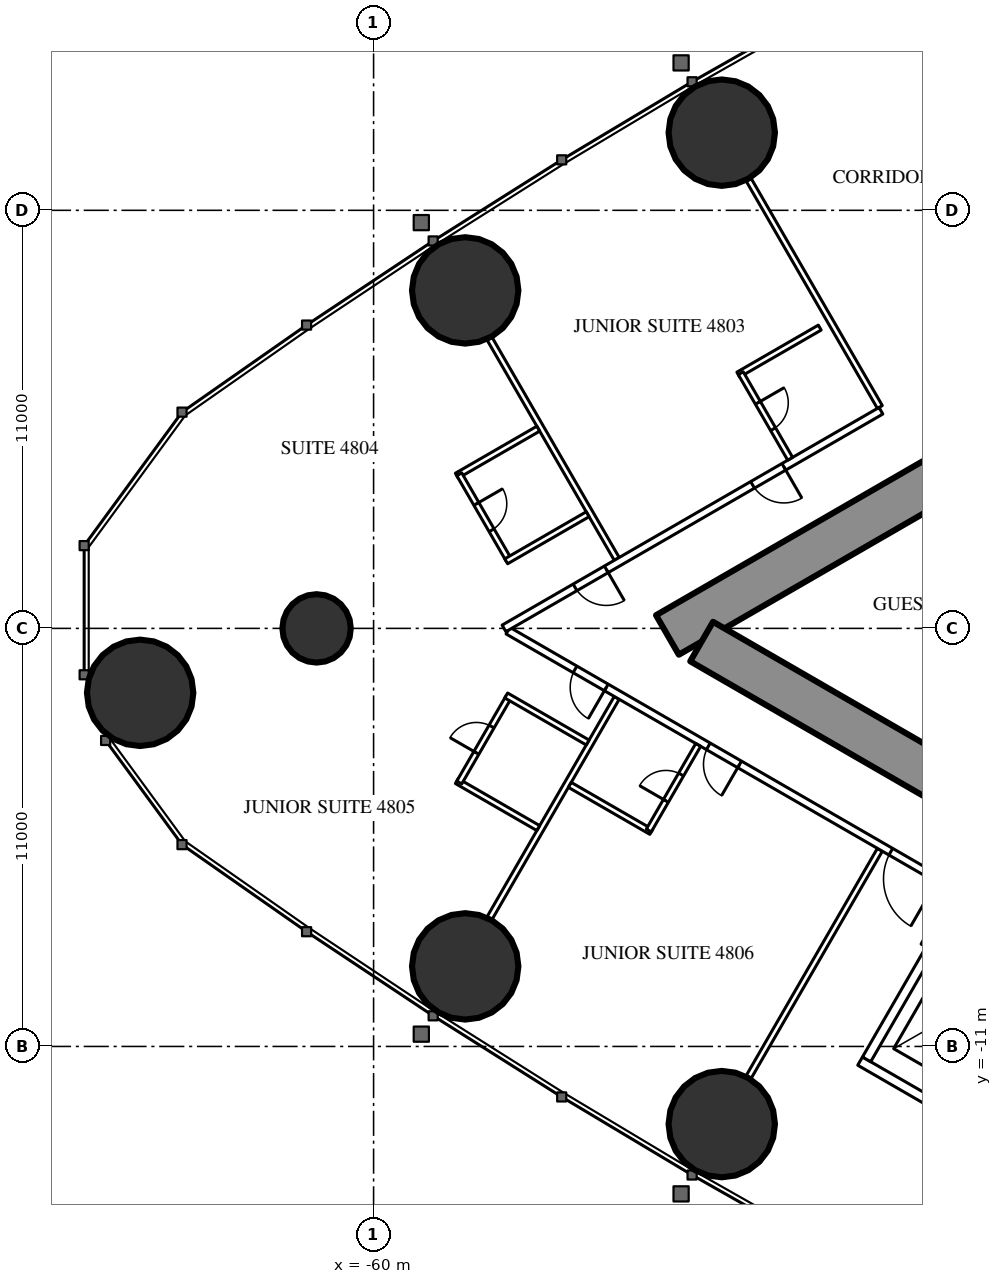
"""IFC4 building model, lengths in metres.
Left out: names, types, materials, properties, quantities, classifications, styles, units other than length and angle.
Written with IfcOpenShell. Run it as: python <this file> out.ifc"""

import sys

from ifc_helpers import new_model, si_unit, direction, frame, frame_2d, origin, origin_2d, place, context, subcontext, project, spatial, rectangle, circle, extrude, element, fill, save


model = new_model("IFC4")
c1 = context("Model", 3, precision=1e-05, world=origin(), true_north=direction((0.0, 1.0)))
c2 = subcontext(c1, "Body", "Model", "MODEL_VIEW")
j1 = project(units=[si_unit("LENGTHUNIT", "METRE"), si_unit("PLANEANGLEUNIT", "RADIAN")], contexts=[c1])
p1 = place(None, origin())
s1 = spatial("IfcSite", under=j1, at=p1, CompositionType="ELEMENT")
p2 = place(p1, origin())
s2 = spatial("IfcBuilding", under=s1, at=p2, CompositionType="ELEMENT")
p3 = place(p2, frame((0.0, 0.0, 180.8)))
s3 = spatial("IfcBuildingStorey", under=s2, at=p3, CompositionType="ELEMENT", Elevation=180.8)
for number, where, z_axis, x_axis in (
    (1, (-66.143, -1.695, 0.0), (0.0, 0.0, 1.0), (1.0, 0.0, 0.0)),
    (2, (-57.59, -8.893, 0.0), (0.0, 0.0, 1.0), (1.0, 0.0, 0.0)),
    (3, (-50.839, -13.043, 0.0), (0.0, 0.0, 1.0), (1.0, 0.0, 0.0)),
    (4, (-50.839, 13.043, 0.0), (0.0, 0.0, 1.0), (1.0, 0.0, 0.0)),
    (5, (-57.59, 8.893, 0.0), (0.0, 0.0, 1.0), (1.0, 0.0, 0.0)),
):
    element("IfcColumn", number, at=place(p3, frame(where, z_axis=z_axis, x_axis=x_axis)), inside=s3, PredefinedType="COLUMN", context=c2, shape_type="SweptSolid", body=[
        extrude(circle(Radius=1.4, at=origin_2d()), origin(), (0.0, 0.0, 1.0), 3.5),
    ])
p4 = place(p3, frame((-61.5, 0.0, 0.0), z_axis=(0.0, 0.0, 1.0), x_axis=(1.0, 0.0, 0.0)))
e6 = element("IfcColumn", 6, at=p4, inside=s3, PredefinedType="COLUMN", context=c2, shape_type="SweptSolid", body=[
    extrude(circle(Radius=0.9, at=origin_2d()), origin(), (0.0, 0.0, 1.0), 3.5),
])
p5 = place(p3, frame((-27.2, 14.3, 0.0), z_axis=(0.0, 0.0, 1.0), x_axis=(-0.866026593062, -0.499997940104, 0.0)))
e7 = element("IfcWall", 7, at=p5, inside=s3, PredefinedType="SHEAR", context=c2, shape_type="SweptSolid", body=[
    extrude(rectangle(XDim=28.946, YDim=1.2, at=frame_2d((14.473, 0.0))), origin(), (0.0, 0.0, 1.0), 3.5),
])
p6 = place(p5, frame((4.6, 0.0, 0.0)))
e8 = element("IfcOpeningElement", 8, at=p6, cuts=e7, PredefinedType="OPENING", context=c2, shape_type="SweptSolid", body=[
    extrude(rectangle(XDim=1.0, YDim=2.2, at=frame_2d((0.5, 1.1))), frame((0.0, 0.61, 0.0), z_axis=(0.0, -1.0, 0.0), x_axis=(1.0, 0.0, 0.0)), (0.0, 0.0, 1.0), 1.22),
])
p7 = place(p5, frame((13.395, 0.0, 0.0)))
e9 = element("IfcOpeningElement", 9, at=p7, cuts=e7, PredefinedType="OPENING", context=c2, shape_type="SweptSolid", body=[
    extrude(rectangle(XDim=1.8, YDim=2.2, at=frame_2d((0.9, 1.1))), frame((0.0, 0.61, 0.0), z_axis=(0.0, -1.0, 0.0), x_axis=(1.0, 0.0, 0.0)), (0.0, 0.0, 1.0), 1.22),
])
p8 = place(p3, frame((-27.2, -14.3, 0.0), z_axis=(0.0, 0.0, 1.0), x_axis=(-0.866024021859, 0.500002393557, 0.0)))
e10 = element("IfcWall", 10, at=p8, inside=s3, PredefinedType="SHEAR", context=c2, shape_type="SweptSolid", body=[
    extrude(rectangle(XDim=27.907, YDim=1.2, at=frame_2d((13.954, 0.0))), origin(), (0.0, 0.0, 1.0), 3.5),
])
p9 = place(p8, frame((4.6, 0.0, 0.0)))
e11 = element("IfcOpeningElement", 11, at=p9, cuts=e10, PredefinedType="OPENING", context=c2, shape_type="SweptSolid", body=[
    extrude(rectangle(XDim=1.0, YDim=2.2, at=frame_2d((0.5, 1.1))), frame((0.0, 0.61, 0.0), z_axis=(0.0, -1.0, 0.0), x_axis=(1.0, 0.0, 0.0)), (0.0, 0.0, 1.0), 1.22),
])
p10 = place(p8, frame((13.395, 0.0, 0.0)))
e12 = element("IfcOpeningElement", 12, at=p10, cuts=e10, PredefinedType="OPENING", context=c2, shape_type="SweptSolid", body=[
    extrude(rectangle(XDim=1.8, YDim=2.2, at=frame_2d((0.9, 1.1))), frame((0.0, 0.61, 0.0), z_axis=(0.0, -1.0, 0.0), x_axis=(1.0, 0.0, 0.0)), (0.0, 0.0, 1.0), 1.22),
])
p11 = place(p3, frame((-46.679, 5.825, 0.0), z_axis=(0.0, 0.0, 1.0), x_axis=(-0.500006839597, 0.866021454905, 0.0)))
e13 = element("IfcWall", 13, at=p11, inside=s3, PredefinedType="PARTITIONING", context=c2, shape_type="SweptSolid", body=[
    extrude(rectangle(XDim=6.911, YDim=0.15, at=frame_2d((3.456, 0.0))), origin(), (0.0, 0.0, 1.0), 2.3),
])
p12 = place(p3, frame((-53.602, 1.828, 0.0), z_axis=(0.0, 0.0, 1.0), x_axis=(-0.49999191814, 0.866030069798, 0.0)))
e14 = element("IfcWall", 14, at=p12, inside=s3, PredefinedType="PARTITIONING", context=c2, shape_type="SweptSolid", body=[
    extrude(rectangle(XDim=6.692, YDim=0.15, at=frame_2d((3.346, 0.0))), origin(), (0.0, 0.0, 1.0), 2.3),
])
p13 = place(p3, frame((-46.679, -5.825, 0.0), z_axis=(0.0, 0.0, 1.0), x_axis=(-0.500006839597, -0.866021454905, 0.0)))
e15 = element("IfcWall", 15, at=p13, inside=s3, PredefinedType="PARTITIONING", context=c2, shape_type="SweptSolid", body=[
    extrude(rectangle(XDim=6.911, YDim=0.15, at=frame_2d((3.456, 0.0))), origin(), (0.0, 0.0, 1.0), 2.3),
])
p14 = place(p3, frame((-53.602, -1.828, 0.0), z_axis=(0.0, 0.0, 1.0), x_axis=(-0.49999191814, -0.866030069798, 0.0)))
e16 = element("IfcWall", 16, at=p14, inside=s3, PredefinedType="PARTITIONING", context=c2, shape_type="SweptSolid", body=[
    extrude(rectangle(XDim=6.692, YDim=0.15, at=frame_2d((3.346, 0.0))), origin(), (0.0, 0.0, 1.0), 2.3),
])
p15 = place(p3, frame((-44.715, -6.844, 0.0), z_axis=(0.0, 0.0, 1.0), x_axis=(-0.866025261224, 0.500000246922, 0.0)))
e17 = element("IfcWall", 17, at=p15, inside=s3, PredefinedType="PARTITIONING", context=c2, shape_type="SweptSolid", body=[
    extrude(rectangle(XDim=13.567, YDim=0.2, at=frame_2d((6.783, 0.0))), origin(), (0.0, 0.0, 1.0), 3.25),
])
p16 = place(p15, frame((10.579, 0.0, 0.0)))
e18 = element("IfcOpeningElement", 18, at=p16, cuts=e17, PredefinedType="OPENING", context=c2, shape_type="SweptSolid", body=[
    extrude(rectangle(XDim=0.95, YDim=2.2, at=frame_2d((0.475, 1.1))), frame((0.0, 0.11, 0.0), z_axis=(0.0, -1.0, 0.0), x_axis=(1.0, 0.0, 0.0)), (0.0, 0.0, 1.0), 0.22),
])
p17 = place(p15, frame((6.529, 0.0, 0.0)))
e19 = element("IfcOpeningElement", 19, at=p17, cuts=e17, PredefinedType="OPENING", context=c2, shape_type="SweptSolid", body=[
    extrude(rectangle(XDim=0.95, YDim=2.2, at=frame_2d((0.475, 1.1))), frame((0.0, 0.11, 0.0), z_axis=(0.0, -1.0, 0.0), x_axis=(1.0, 0.0, 0.0)), (0.0, 0.0, 1.0), 0.22),
])
p18 = place(p15, frame((0.5, 0.0, 0.0)))
e20 = element("IfcOpeningElement", 20, at=p18, cuts=e17, PredefinedType="OPENING", context=c2, shape_type="SweptSolid", body=[
    extrude(rectangle(XDim=1.435, YDim=2.2, at=frame_2d((0.718, 1.1))), frame((0.0, 0.11, 0.0), z_axis=(0.0, -1.0, 0.0), x_axis=(1.0, 0.0, 0.0)), (0.0, 0.0, 1.0), 0.22),
])
p19 = place(p3, frame((-44.652, -6.764, 0.0), z_axis=(0.0, 0.0, 1.0), x_axis=(-0.485424724123, -0.874278466629, 0.0)))
e21 = element("IfcWall", 21, at=p19, inside=s3, PredefinedType="PARTITIONING", context=c2, shape_type="SweptSolid", body=[
    extrude(rectangle(XDim=1.805, YDim=0.15, at=frame_2d((0.903, 0.0))), origin(), (0.0, 0.0, 1.0), 3.25),
])
p20 = place(p3, frame((-46.65, 5.726, 0.0), z_axis=(0.0, 0.0, 1.0), x_axis=(-0.866027963864, -0.499995565786, 0.0)))
e22 = element("IfcWall", 22, at=p20, inside=s3, PredefinedType="PARTITIONING", context=c2, shape_type="SweptSolid", body=[
    extrude(rectangle(XDim=11.452, YDim=0.2, at=frame_2d((5.726, 0.0))), origin(), (0.0, 0.0, 1.0), 3.25),
])
p21 = place(p20, frame((2.95, 0.0, 0.0)))
e23 = element("IfcOpeningElement", 23, at=p21, cuts=e22, PredefinedType="OPENING", context=c2, shape_type="SweptSolid", body=[
    extrude(rectangle(XDim=0.95, YDim=2.2, at=frame_2d((0.475, 1.1))), frame((0.0, 0.11, 0.0), z_axis=(0.0, -1.0, 0.0), x_axis=(1.0, 0.0, 0.0)), (0.0, 0.0, 1.0), 0.22),
])
p22 = place(p20, frame((8.344, 0.0, 0.0)))
e24 = element("IfcOpeningElement", 24, at=p22, cuts=e22, PredefinedType="OPENING", context=c2, shape_type="SweptSolid", body=[
    extrude(rectangle(XDim=0.95, YDim=2.2, at=frame_2d((0.475, 1.1))), frame((0.0, 0.11, 0.0), z_axis=(0.0, -1.0, 0.0), x_axis=(1.0, 0.0, 0.0)), (0.0, 0.0, 1.0), 0.22),
])
p23 = place(p3, frame((-48.26, 7.914, 0.0), z_axis=(0.0, 0.0, 1.0), x_axis=(-0.866031185235, -0.4999899861, 0.0)))
e25 = element("IfcWall", 25, at=p23, inside=s3, PredefinedType="PARTITIONING", context=c2, shape_type="SweptSolid", body=[
    extrude(rectangle(XDim=2.475, YDim=0.15, at=frame_2d((1.238, 0.0))), origin(), (0.0, 0.0, 1.0), 3.25),
])
p24 = place(p3, frame((-49.039, 4.463, 0.0), z_axis=(0.0, 0.0, 1.0), x_axis=(-0.499936506574, 0.866062058628, 0.0)))
e26 = element("IfcWall", 26, at=p24, inside=s3, PredefinedType="PARTITIONING", context=c2, shape_type="SweptSolid", body=[
    extrude(rectangle(XDim=2.6, YDim=0.15, at=frame_2d((1.3, 0.0))), origin(), (0.0, 0.0, 1.0), 3.25),
])
p25 = place(p24, frame((0.9, 0.0, 0.0)))
e27 = element("IfcOpeningElement", 27, at=p25, cuts=e26, PredefinedType="OPENING", context=c2, shape_type="SweptSolid", body=[
    extrude(rectangle(XDim=0.8, YDim=2.2, at=frame_2d((0.4, 1.1))), frame((0.0, 0.085, 0.0), z_axis=(0.0, -1.0, 0.0), x_axis=(1.0, 0.0, 0.0)), (0.0, 0.0, 1.0), 0.17),
])
p26 = place(p3, frame((-55.667, 5.255, 0.0), z_axis=(0.0, 0.0, 1.0), x_axis=(-0.866006523861, -0.500032699561, 0.0)))
e28 = element("IfcWall", 28, at=p26, inside=s3, PredefinedType="PARTITIONING", context=c2, shape_type="SweptSolid", body=[
    extrude(rectangle(XDim=2.475, YDim=0.15, at=frame_2d((1.237, 0.0))), origin(), (0.0, 0.0, 1.0), 3.25),
])
p27 = place(p3, frame((-56.446, 1.803, 0.0), z_axis=(0.0, 0.0, 1.0), x_axis=(-0.499936506574, 0.866062058628, 0.0)))
e29 = element("IfcWall", 29, at=p27, inside=s3, PredefinedType="PARTITIONING", context=c2, shape_type="SweptSolid", body=[
    extrude(rectangle(XDim=2.6, YDim=0.15, at=frame_2d((1.3, 0.0))), origin(), (0.0, 0.0, 1.0), 3.25),
])
p28 = place(p27, frame((0.9, 0.0, 0.0)))
e30 = element("IfcOpeningElement", 30, at=p28, cuts=e29, PredefinedType="OPENING", context=c2, shape_type="SweptSolid", body=[
    extrude(rectangle(XDim=0.8, YDim=2.2, at=frame_2d((0.4, 1.1))), frame((0.0, 0.085, 0.0), z_axis=(0.0, -1.0, 0.0), x_axis=(1.0, 0.0, 0.0)), (0.0, 0.0, 1.0), 0.17),
])
p29 = place(p3, frame((-54.367, 3.003, 0.0), z_axis=(0.0, 0.0, 1.0), x_axis=(-0.866031185235, -0.4999899861, 0.0)))
e31 = element("IfcWall", 31, at=p29, inside=s3, PredefinedType="PARTITIONING", context=c2, shape_type="SweptSolid", body=[
    extrude(rectangle(XDim=2.475, YDim=0.15, at=frame_2d((1.238, 0.0))), origin(), (0.0, 0.0, 1.0), 3.25),
])
p30 = place(p3, frame((-55.667, -5.255, 0.0), z_axis=(0.0, 0.0, 1.0), x_axis=(-0.866006523861, 0.500032699561, 0.0)))
e32 = element("IfcWall", 32, at=p30, inside=s3, PredefinedType="PARTITIONING", context=c2, shape_type="SweptSolid", body=[
    extrude(rectangle(XDim=2.475, YDim=0.15, at=frame_2d((1.237, 0.0))), origin(), (0.0, 0.0, 1.0), 3.25),
])
p31 = place(p3, frame((-56.446, -1.803, 0.0), z_axis=(0.0, 0.0, 1.0), x_axis=(-0.499936506574, -0.866062058628, 0.0)))
e33 = element("IfcWall", 33, at=p31, inside=s3, PredefinedType="PARTITIONING", context=c2, shape_type="SweptSolid", body=[
    extrude(rectangle(XDim=2.6, YDim=0.15, at=frame_2d((1.3, 0.0))), origin(), (0.0, 0.0, 1.0), 3.25),
])
p32 = place(p31, frame((0.9, 0.0, 0.0)))
e34 = element("IfcOpeningElement", 34, at=p32, cuts=e33, PredefinedType="OPENING", context=c2, shape_type="SweptSolid", body=[
    extrude(rectangle(XDim=0.8, YDim=2.2, at=frame_2d((0.4, 1.1))), frame((0.0, 0.085, 0.0), z_axis=(0.0, -1.0, 0.0), x_axis=(1.0, 0.0, 0.0)), (0.0, 0.0, 1.0), 0.17),
])
for number, where, z_axis, x_axis in (
    (35, (-54.367, -3.003, 0.0), (0.0, 0.0, 1.0), (-0.866, 0.5, 0.0)),
    (36, (-52.694, -5.355, 0.0), (0.0, 0.0, 1.0), (-0.866, 0.5, 0.0)),
):
    element("IfcWall", number, at=place(p3, frame(where, z_axis=z_axis, x_axis=x_axis)), inside=s3, PredefinedType="PARTITIONING", context=c2, shape_type="SweptSolid", body=[
        extrude(rectangle(XDim=2.475, YDim=0.15, at=frame_2d((1.238, 0.0))), origin(), (0.0, 0.0, 1.0), 3.25),
    ])
p33 = place(p3, frame((-51.459, -3.065, 0.0), z_axis=(0.0, 0.0, 1.0), x_axis=(-0.499936506574, -0.866062058628, 0.0)))
e37 = element("IfcWall", 37, at=p33, inside=s3, PredefinedType="PARTITIONING", context=c2, shape_type="SweptSolid", body=[
    extrude(rectangle(XDim=2.6, YDim=0.15, at=frame_2d((1.3, 0.0))), origin(), (0.0, 0.0, 1.0), 3.25),
])
p34 = place(p33, frame((0.9, 0.0, 0.0)))
e38 = element("IfcOpeningElement", 38, at=p34, cuts=e37, PredefinedType="OPENING", context=c2, shape_type="SweptSolid", body=[
    extrude(rectangle(XDim=0.8, YDim=2.2, at=frame_2d((0.4, 1.1))), frame((0.0, 0.085, 0.0), z_axis=(0.0, -1.0, 0.0), x_axis=(1.0, 0.0, 0.0)), (0.0, 0.0, 1.0), 0.17),
])
p35 = place(p3, frame((-41.482, -14.686, 0.0), z_axis=(0.0, 0.0, 1.0), x_axis=(-0.86603344179, 0.499986077507, 0.0)))
e39 = element("IfcWall", 39, at=p35, inside=s3, PredefinedType="PARTITIONING", context=c2, shape_type="SweptSolid", body=[
    extrude(rectangle(XDim=6.6, YDim=0.25, at=frame_2d((3.3, 0.0))), origin(), (0.0, 0.0, 1.0), 3.25),
])
p36 = place(p3, frame((-45.428, -8.568, 0.0), z_axis=(0.0, 0.0, 1.0), x_axis=(-0.499929347863, -0.866066190972, 0.0)))
e40 = element("IfcWall", 40, at=p36, inside=s3, PredefinedType="PARTITIONING", context=c2, shape_type="SweptSolid", body=[
    extrude(rectangle(XDim=3.201, YDim=0.25, at=frame_2d((1.6, 0.0))), origin(), (0.0, 0.0, 1.0), 3.25),
])
p37 = place(p25, origin())
e41 = element("IfcDoor", 41, at=p37, inside=s3, OperationType="SINGLE_SWING_RIGHT", PredefinedType="DOOR", context=c2, shape_type="SweptSolid", body=[
    extrude(rectangle(XDim=0.8, YDim=2.2, at=frame_2d((0.4, 1.1))), frame((0.0, 0.025, 0.0), z_axis=(0.0, -1.0, 0.0), x_axis=(1.0, 0.0, 0.0)), (0.0, 0.0, 1.0), 0.05),
])
fill(e27, e41)
p38 = place(p21, origin())
e42 = element("IfcDoor", 42, at=p38, inside=s3, OperationType="SINGLE_SWING_LEFT", PredefinedType="DOOR", context=c2, shape_type="SweptSolid", body=[
    extrude(rectangle(XDim=0.95, YDim=2.2, at=frame_2d((0.475, 1.1))), frame((0.0, 0.025, 0.0), z_axis=(0.0, -1.0, 0.0), x_axis=(1.0, 0.0, 0.0)), (0.0, 0.0, 1.0), 0.05),
])
fill(e23, e42)
p39 = place(p28, origin())
e43 = element("IfcDoor", 43, at=p39, inside=s3, OperationType="SINGLE_SWING_RIGHT", PredefinedType="DOOR", context=c2, shape_type="SweptSolid", body=[
    extrude(rectangle(XDim=0.8, YDim=2.2, at=frame_2d((0.4, 1.1))), frame((0.0, 0.025, 0.0), z_axis=(0.0, -1.0, 0.0), x_axis=(1.0, 0.0, 0.0)), (0.0, 0.0, 1.0), 0.05),
])
fill(e30, e43)
p40 = place(p22, origin())
e44 = element("IfcDoor", 44, at=p40, inside=s3, OperationType="SINGLE_SWING_LEFT", PredefinedType="DOOR", context=c2, shape_type="SweptSolid", body=[
    extrude(rectangle(XDim=0.95, YDim=2.2, at=frame_2d((0.475, 1.1))), frame((0.0, 0.025, 0.0), z_axis=(0.0, -1.0, 0.0), x_axis=(1.0, 0.0, 0.0)), (0.0, 0.0, 1.0), 0.05),
])
fill(e24, e44)
p41 = place(p32, origin())
e45 = element("IfcDoor", 45, at=p41, inside=s3, OperationType="SINGLE_SWING_RIGHT", PredefinedType="DOOR", context=c2, shape_type="SweptSolid", body=[
    extrude(rectangle(XDim=0.8, YDim=2.2, at=frame_2d((0.4, 1.1))), frame((0.0, 0.025, 0.0), z_axis=(0.0, -1.0, 0.0), x_axis=(1.0, 0.0, 0.0)), (0.0, 0.0, 1.0), 0.05),
])
fill(e34, e45)
p42 = place(p16, origin())
e46 = element("IfcDoor", 46, at=p42, inside=s3, OperationType="SINGLE_SWING_LEFT", PredefinedType="DOOR", context=c2, shape_type="SweptSolid", body=[
    extrude(rectangle(XDim=0.95, YDim=2.2, at=frame_2d((0.475, 1.1))), frame((0.0, 0.025, 0.0), z_axis=(0.0, -1.0, 0.0), x_axis=(1.0, 0.0, 0.0)), (0.0, 0.0, 1.0), 0.05),
])
fill(e18, e46)
p43 = place(p34, origin())
e47 = element("IfcDoor", 47, at=p43, inside=s3, OperationType="SINGLE_SWING_RIGHT", PredefinedType="DOOR", context=c2, shape_type="SweptSolid", body=[
    extrude(rectangle(XDim=0.8, YDim=2.2, at=frame_2d((0.4, 1.1))), frame((0.0, 0.025, 0.0), z_axis=(0.0, -1.0, 0.0), x_axis=(1.0, 0.0, 0.0)), (0.0, 0.0, 1.0), 0.05),
])
fill(e38, e47)
p44 = place(p17, origin())
e48 = element("IfcDoor", 48, at=p44, inside=s3, OperationType="SINGLE_SWING_LEFT", PredefinedType="DOOR", context=c2, shape_type="SweptSolid", body=[
    extrude(rectangle(XDim=0.95, YDim=2.2, at=frame_2d((0.475, 1.1))), frame((0.0, 0.025, 0.0), z_axis=(0.0, -1.0, 0.0), x_axis=(1.0, 0.0, 0.0)), (0.0, 0.0, 1.0), 0.05),
])
fill(e19, e48)
p45 = place(p18, origin())
e49 = element("IfcDoor", 49, at=p45, inside=s3, OperationType="SINGLE_SWING_LEFT", PredefinedType="DOOR", context=c2, shape_type="SweptSolid", body=[
    extrude(rectangle(XDim=1.435, YDim=2.2, at=frame_2d((0.718, 1.1))), frame((0.0, 0.025, 0.0), z_axis=(0.0, -1.0, 0.0), x_axis=(1.0, 0.0, 0.0)), (0.0, 0.0, 1.0), 0.05),
])
fill(e20, e49)
save(model, sys.argv[1])
